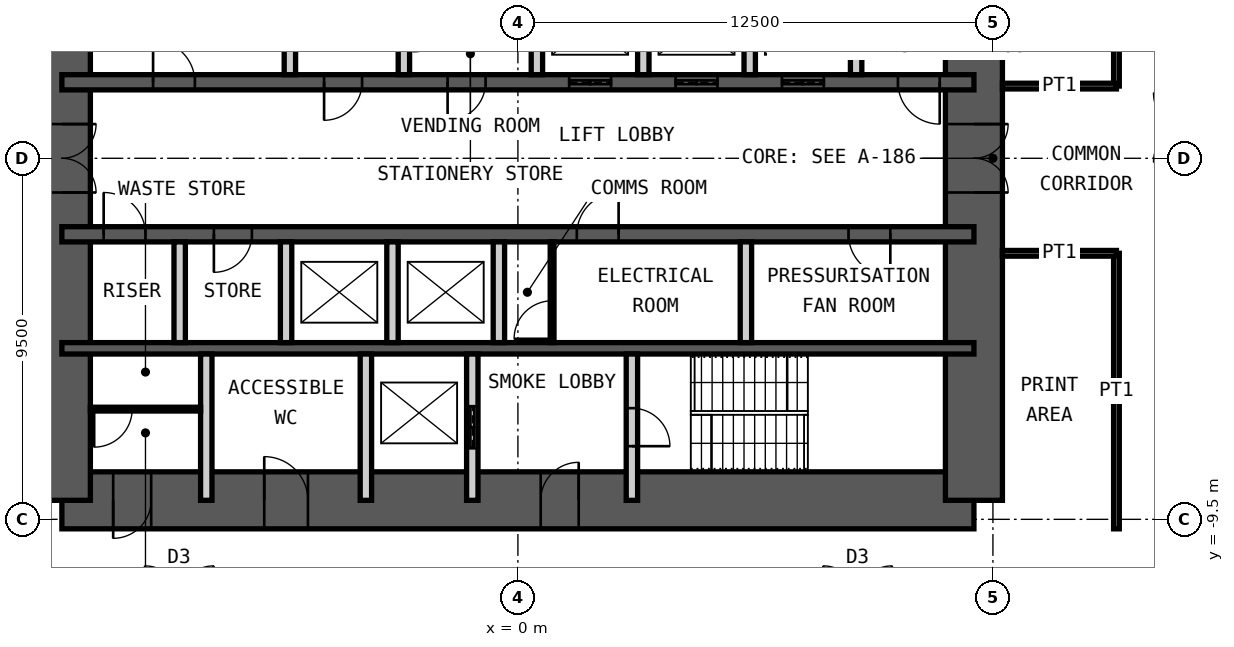
"""IFC4 building model, lengths in metres.
Left out: names, types, materials, properties, quantities, classifications, styles, units other than length and angle.
Written with IfcOpenShell. Run it as: python <this file> out.ifc"""

import sys

from ifc_helpers import new_model, si_unit, direction, frame, frame_2d, origin, place, context, subcontext, project, spatial, rectangle, extrude, element, fill, save


model = new_model("IFC4")
c1 = context("Model", 3, precision=1e-05, world=origin(), true_north=direction((0.0, 1.0)))
c2 = subcontext(c1, "Body", "Model", "MODEL_VIEW")
j1 = project(units=[si_unit("LENGTHUNIT", "METRE"), si_unit("PLANEANGLEUNIT", "RADIAN")], contexts=[c1])
p1 = place(None, origin())
s1 = spatial("IfcSite", under=j1, at=p1, CompositionType="ELEMENT")
p2 = place(p1, origin())
s2 = spatial("IfcBuilding", under=s1, at=p2, CompositionType="ELEMENT")
p3 = place(p2, frame((0.0, 0.0, 140.8)))
s3 = spatial("IfcBuildingStorey", under=s2, at=p3, CompositionType="ELEMENT", Elevation=140.8)
p4 = place(p3, frame((-12.0, -9.0, 0.0), z_axis=(0.0, 0.0, 1.0), x_axis=(1.0, 0.0, 0.0)))
e1 = element("IfcWall", 1, at=p4, inside=s3, PredefinedType="SHEAR", context=c2, shape_type="SweptSolid", body=[
    extrude(rectangle(XDim=24.0, YDim=1.5, at=frame_2d((12.0, 0.0))), origin(), (0.0, 0.0, 1.0), 4.2),
])
p5 = place(p4, frame((1.35, 0.0, 0.0)))
e2 = element("IfcOpeningElement", 2, at=p5, cuts=e1, PredefinedType="OPENING", context=c2, shape_type="SweptSolid", body=[
    extrude(rectangle(XDim=1.0, YDim=2.1, at=frame_2d((0.5, 1.05))), frame((0.0, 0.76, 0.0), z_axis=(0.0, -1.0, 0.0), x_axis=(1.0, 0.0, 0.0)), (0.0, 0.0, 1.0), 1.52),
])
p6 = place(p4, frame((5.325, 0.0, 0.0)))
e3 = element("IfcOpeningElement", 3, at=p6, cuts=e1, PredefinedType="OPENING", context=c2, shape_type="SweptSolid", body=[
    extrude(rectangle(XDim=1.15, YDim=2.1, at=frame_2d((0.575, 1.05))), frame((0.0, 0.76, 0.0), z_axis=(0.0, -1.0, 0.0), x_axis=(1.0, 0.0, 0.0)), (0.0, 0.0, 1.0), 1.52),
])
p7 = place(p4, frame((12.6, 0.0, 0.0)))
e4 = element("IfcOpeningElement", 4, at=p7, cuts=e1, PredefinedType="OPENING", context=c2, shape_type="SweptSolid", body=[
    extrude(rectangle(XDim=1.0, YDim=2.1, at=frame_2d((0.5, 1.05))), frame((0.0, 0.76, 0.0), z_axis=(0.0, -1.0, 0.0), x_axis=(1.0, 0.0, 0.0)), (0.0, 0.0, 1.0), 1.52),
])
p8 = place(p3, frame((12.0, -9.0, 0.0), z_axis=(0.0, 0.0, 1.0), x_axis=(0.0, 1.0, 0.0)))
e5 = element("IfcWall", 5, at=p8, inside=s3, PredefinedType="SHEAR", context=c2, shape_type="SweptSolid", body=[
    extrude(rectangle(XDim=18.0, YDim=1.5, at=frame_2d((9.0, 0.0))), origin(), (0.0, 0.0, 1.0), 4.2),
])
p9 = place(p8, frame((8.1, 0.0, 0.0)))
e6 = element("IfcOpeningElement", 6, at=p9, cuts=e5, PredefinedType="OPENING", context=c2, shape_type="SweptSolid", body=[
    extrude(rectangle(XDim=1.8, YDim=2.1, at=frame_2d((0.9, 1.05))), frame((0.0, 0.76, 0.0), z_axis=(0.0, -1.0, 0.0), x_axis=(1.0, 0.0, 0.0)), (0.0, 0.0, 1.0), 1.52),
])
p10 = place(p3, frame((-12.0, -9.0, 0.0), z_axis=(0.0, 0.0, 1.0), x_axis=(0.0, 1.0, 0.0)))
e7 = element("IfcWall", 7, at=p10, inside=s3, PredefinedType="SHEAR", context=c2, shape_type="SweptSolid", body=[
    extrude(rectangle(XDim=18.0, YDim=1.5, at=frame_2d((9.0, 0.0))), origin(), (0.0, 0.0, 1.0), 4.2),
])
p11 = place(p10, frame((8.1, 0.0, 0.0)))
e8 = element("IfcOpeningElement", 8, at=p11, cuts=e7, PredefinedType="OPENING", context=c2, shape_type="SweptSolid", body=[
    extrude(rectangle(XDim=1.8, YDim=2.1, at=frame_2d((0.9, 1.05))), frame((0.0, 0.76, 0.0), z_axis=(0.0, -1.0, 0.0), x_axis=(1.0, 0.0, 0.0)), (0.0, 0.0, 1.0), 1.52),
])
p12 = place(p3, frame((-12.0, 2.0, 0.0), z_axis=(0.0, 0.0, 1.0), x_axis=(1.0, 0.0, 0.0)))
e9 = element("IfcWall", 9, at=p12, inside=s3, PredefinedType="SHEAR", context=c2, shape_type="SweptSolid", body=[
    extrude(rectangle(XDim=24.0, YDim=0.4, at=frame_2d((12.0, 0.0))), origin(), (0.0, 0.0, 1.0), 4.2),
])
p13 = place(p12, frame((2.4, 0.0, 0.0)))
e10 = element("IfcOpeningElement", 10, at=p13, cuts=e9, PredefinedType="OPENING", context=c2, shape_type="SweptSolid", body=[
    extrude(rectangle(XDim=1.1, YDim=2.1, at=frame_2d((0.55, 1.05))), frame((0.0, 0.21, 0.0), z_axis=(0.0, -1.0, 0.0), x_axis=(1.0, 0.0, 0.0)), (0.0, 0.0, 1.0), 0.42),
])
p14 = place(p12, frame((22.0, 0.0, 0.0)))
e11 = element("IfcOpeningElement", 11, at=p14, cuts=e9, PredefinedType="OPENING", context=c2, shape_type="SweptSolid", body=[
    extrude(rectangle(XDim=1.1, YDim=2.1, at=frame_2d((0.55, 1.05))), frame((0.0, 0.21, 0.0), z_axis=(0.0, -1.0, 0.0), x_axis=(1.0, 0.0, 0.0)), (0.0, 0.0, 1.0), 0.42),
])
p15 = place(p12, frame((10.15, 0.0, 0.0)))
e12 = element("IfcOpeningElement", 12, at=p15, cuts=e9, PredefinedType="OPENING", context=c2, shape_type="SweptSolid", body=[
    extrude(rectangle(XDim=1.0, YDim=2.1, at=frame_2d((0.5, 1.05))), frame((0.0, 0.21, 0.0), z_axis=(0.0, -1.0, 0.0), x_axis=(1.0, 0.0, 0.0)), (0.0, 0.0, 1.0), 0.42),
])
p16 = place(p12, frame((6.9, 0.0, 0.0)))
e13 = element("IfcOpeningElement", 13, at=p16, cuts=e9, PredefinedType="OPENING", context=c2, shape_type="SweptSolid", body=[
    extrude(rectangle(XDim=1.0, YDim=2.1, at=frame_2d((0.5, 1.05))), frame((0.0, 0.21, 0.0), z_axis=(0.0, -1.0, 0.0), x_axis=(1.0, 0.0, 0.0)), (0.0, 0.0, 1.0), 0.42),
])
p17 = place(p12, frame((13.35, 0.0, 0.0)))
e14 = element("IfcOpeningElement", 14, at=p17, cuts=e9, PredefinedType="OPENING", context=c2, shape_type="SweptSolid", body=[
    extrude(rectangle(XDim=1.1, YDim=2.4, at=frame_2d((0.55, 1.2))), frame((0.0, 0.21, 0.0), z_axis=(0.0, -1.0, 0.0), x_axis=(1.0, 0.0, 0.0)), (0.0, 0.0, 1.0), 0.42),
])
p18 = place(p12, frame((16.15, 0.0, 0.0)))
e15 = element("IfcOpeningElement", 15, at=p18, cuts=e9, PredefinedType="OPENING", context=c2, shape_type="SweptSolid", body=[
    extrude(rectangle(XDim=1.1, YDim=2.4, at=frame_2d((0.55, 1.2))), frame((0.0, 0.21, 0.0), z_axis=(0.0, -1.0, 0.0), x_axis=(1.0, 0.0, 0.0)), (0.0, 0.0, 1.0), 0.42),
])
p19 = place(p12, frame((18.95, 0.0, 0.0)))
e16 = element("IfcOpeningElement", 16, at=p19, cuts=e9, PredefinedType="OPENING", context=c2, shape_type="SweptSolid", body=[
    extrude(rectangle(XDim=1.1, YDim=2.4, at=frame_2d((0.55, 1.2))), frame((0.0, 0.21, 0.0), z_axis=(0.0, -1.0, 0.0), x_axis=(1.0, 0.0, 0.0)), (0.0, 0.0, 1.0), 0.42),
])
p20 = place(p3, frame((-12.0, -2.0, 0.0), z_axis=(0.0, 0.0, 1.0), x_axis=(1.0, 0.0, 0.0)))
e17 = element("IfcWall", 17, at=p20, inside=s3, PredefinedType="SHEAR", context=c2, shape_type="SweptSolid", body=[
    extrude(rectangle(XDim=24.0, YDim=0.4, at=frame_2d((12.0, 0.0))), origin(), (0.0, 0.0, 1.0), 4.2),
])
p21 = place(p20, frame((1.1, 0.0, 0.0)))
e18 = element("IfcOpeningElement", 18, at=p21, cuts=e17, PredefinedType="OPENING", context=c2, shape_type="SweptSolid", body=[
    extrude(rectangle(XDim=1.1, YDim=2.1, at=frame_2d((0.55, 1.05))), frame((0.0, 0.21, 0.0), z_axis=(0.0, -1.0, 0.0), x_axis=(1.0, 0.0, 0.0)), (0.0, 0.0, 1.0), 0.42),
])
p22 = place(p20, frame((13.55, 0.0, 0.0)))
e19 = element("IfcOpeningElement", 19, at=p22, cuts=e17, PredefinedType="OPENING", context=c2, shape_type="SweptSolid", body=[
    extrude(rectangle(XDim=1.1, YDim=2.1, at=frame_2d((0.55, 1.05))), frame((0.0, 0.21, 0.0), z_axis=(0.0, -1.0, 0.0), x_axis=(1.0, 0.0, 0.0)), (0.0, 0.0, 1.0), 0.42),
])
p23 = place(p20, frame((20.7, 0.0, 0.0)))
e20 = element("IfcOpeningElement", 20, at=p23, cuts=e17, PredefinedType="OPENING", context=c2, shape_type="SweptSolid", body=[
    extrude(rectangle(XDim=1.1, YDim=2.1, at=frame_2d((0.55, 1.05))), frame((0.0, 0.21, 0.0), z_axis=(0.0, -1.0, 0.0), x_axis=(1.0, 0.0, 0.0)), (0.0, 0.0, 1.0), 0.42),
])
p24 = place(p20, frame((4.0, 0.0, 0.0)))
e21 = element("IfcOpeningElement", 21, at=p24, cuts=e17, PredefinedType="OPENING", context=c2, shape_type="SweptSolid", body=[
    extrude(rectangle(XDim=1.0, YDim=2.1, at=frame_2d((0.5, 1.05))), frame((0.0, 0.21, 0.0), z_axis=(0.0, -1.0, 0.0), x_axis=(1.0, 0.0, 0.0)), (0.0, 0.0, 1.0), 0.42),
])
p25 = place(p3, frame((-12.0, -5.0, 0.0), z_axis=(0.0, 0.0, 1.0), x_axis=(1.0, 0.0, 0.0)))
e22 = element("IfcWall", 22, at=p25, inside=s3, PredefinedType="SHEAR", context=c2, shape_type="SweptSolid", body=[
    extrude(rectangle(XDim=24.0, YDim=0.3, at=frame_2d((12.0, 0.0))), origin(), (0.0, 0.0, 1.0), 4.2),
])
for number, where, z_axis, x_axis in (
    (23, (-6.0, 2.2, 0.0), (0.0, 0.0, 1.0), (0.0, 1.0, 0.0)),
    (24, (-3.0, 2.2, 0.0), (0.0, 0.0, 1.0), (0.0, 1.0, 0.0)),
    (25, (0.5, 2.2, 0.0), (0.0, 0.0, 1.0), (0.0, 1.0, 0.0)),
    (26, (3.3, 2.2, 0.0), (0.0, 0.0, 1.0), (0.0, 1.0, 0.0)),
    (27, (6.1, 2.2, 0.0), (0.0, 0.0, 1.0), (0.0, 1.0, 0.0)),
    (28, (8.9, 2.2, 0.0), (0.0, 0.0, 1.0), (0.0, 1.0, 0.0)),
    (29, (-8.9, -4.85, 0.0), (0.0, 0.0, 1.0), (0.0, 1.0, 0.0)),
    (30, (-6.1, -4.85, 0.0), (0.0, 0.0, 1.0), (0.0, 1.0, 0.0)),
    (31, (-3.3, -4.85, 0.0), (0.0, 0.0, 1.0), (0.0, 1.0, 0.0)),
    (32, (-0.5, -4.85, 0.0), (0.0, 0.0, 1.0), (0.0, 1.0, 0.0)),
    (33, (6.0, -4.85, 0.0), (0.0, 0.0, 1.0), (0.0, 1.0, 0.0)),
):
    element("IfcWall", number, at=place(p3, frame(where, z_axis=z_axis, x_axis=x_axis)), inside=s3, PredefinedType="PARTITIONING", context=c2, shape_type="SweptSolid", body=[
        extrude(rectangle(XDim=2.65, YDim=0.3, at=frame_2d((1.325, 0.0))), origin(), (0.0, 0.0, 1.0), 3.98),
    ])
for number, where, z_axis, x_axis in (
    (34, (-8.2, -9.0, 0.0), (0.0, 0.0, 1.0), (0.0, 1.0, 0.0)),
    (35, (-4.0, -9.0, 0.0), (0.0, 0.0, 1.0), (0.0, 1.0, 0.0)),
):
    element("IfcWall", number, at=place(p3, frame(where, z_axis=z_axis, x_axis=x_axis)), inside=s3, PredefinedType="PARTITIONING", context=c2, shape_type="SweptSolid", body=[
        extrude(rectangle(XDim=3.85, YDim=0.3, at=frame_2d((1.925, 0.0))), origin(), (0.0, 0.0, 1.0), 3.98),
    ])
p26 = place(p3, frame((-1.2, -9.0, 0.0), z_axis=(0.0, 0.0, 1.0), x_axis=(0.0, 1.0, 0.0)))
e36 = element("IfcWall", 36, at=p26, inside=s3, PredefinedType="PARTITIONING", context=c2, shape_type="SweptSolid", body=[
    extrude(rectangle(XDim=3.85, YDim=0.3, at=frame_2d((1.925, 0.0))), origin(), (0.0, 0.0, 1.0), 3.98),
])
p27 = place(p26, frame((1.375, 0.0, 0.0)))
e37 = element("IfcOpeningElement", 37, at=p27, cuts=e36, PredefinedType="OPENING", context=c2, shape_type="SweptSolid", body=[
    extrude(rectangle(XDim=1.1, YDim=2.4, at=frame_2d((0.55, 1.2))), frame((0.0, 0.16, 0.0), z_axis=(0.0, -1.0, 0.0), x_axis=(1.0, 0.0, 0.0)), (0.0, 0.0, 1.0), 0.32),
])
p28 = place(p3, frame((3.0, -9.0, 0.0), z_axis=(0.0, 0.0, 1.0), x_axis=(0.0, 1.0, 0.0)))
e38 = element("IfcWall", 38, at=p28, inside=s3, PredefinedType="PARTITIONING", context=c2, shape_type="SweptSolid", body=[
    extrude(rectangle(XDim=3.85, YDim=0.3, at=frame_2d((1.925, 0.0))), origin(), (0.0, 0.0, 1.0), 3.98),
])
p29 = place(p28, frame((1.425, 0.0, 0.0)))
e39 = element("IfcOpeningElement", 39, at=p29, cuts=e38, PredefinedType="OPENING", context=c2, shape_type="SweptSolid", body=[
    extrude(rectangle(XDim=1.0, YDim=2.1, at=frame_2d((0.5, 1.05))), frame((0.0, 0.16, 0.0), z_axis=(0.0, -1.0, 0.0), x_axis=(1.0, 0.0, 0.0)), (0.0, 0.0, 1.0), 0.32),
])
p30 = place(p3, frame((0.9, -4.85, 0.0), z_axis=(0.0, 0.0, 1.0), x_axis=(0.0, 1.0, 0.0)))
e40 = element("IfcWall", 40, at=p30, inside=s3, PredefinedType="PARTITIONING", context=c2, shape_type="SweptSolid", body=[
    extrude(rectangle(XDim=2.65, YDim=0.1, at=frame_2d((1.325, 0.0))), origin(), (0.0, 0.0, 1.0), 3.98),
])
p31 = place(p30, frame((0.1, 0.0, 0.0)))
e41 = element("IfcOpeningElement", 41, at=p31, cuts=e40, PredefinedType="OPENING", context=c2, shape_type="SweptSolid", body=[
    extrude(rectangle(XDim=1.0, YDim=2.4, at=frame_2d((0.5, 1.2))), frame((0.0, 0.06, 0.0), z_axis=(0.0, -1.0, 0.0), x_axis=(1.0, 0.0, 0.0)), (0.0, 0.0, 1.0), 0.12),
])
p32 = place(p3, frame((-11.25, -6.6, 0.0), z_axis=(0.0, 0.0, 1.0), x_axis=(1.0, 0.0, 0.0)))
e42 = element("IfcWall", 42, at=p32, inside=s3, PredefinedType="PARTITIONING", context=c2, shape_type="SweptSolid", body=[
    extrude(rectangle(XDim=2.9, YDim=0.1, at=frame_2d((1.45, 0.0))), origin(), (0.0, 0.0, 1.0), 3.98),
])
p33 = place(p32, frame((0.1, 0.0, 0.0)))
e43 = element("IfcOpeningElement", 43, at=p33, cuts=e42, PredefinedType="OPENING", context=c2, shape_type="SweptSolid", body=[
    extrude(rectangle(XDim=1.0, YDim=2.4, at=frame_2d((0.5, 1.2))), frame((0.0, 0.06, 0.0), z_axis=(0.0, -1.0, 0.0), x_axis=(1.0, 0.0, 0.0)), (0.0, 0.0, 1.0), 0.12),
])
p34 = place(p3, frame((15.75, 1.9, 0.0), z_axis=(0.0, 0.0, 1.0), x_axis=(0.0, 1.0, 0.0)))
e44 = element("IfcWall", 44, at=p34, inside=s3, PredefinedType="PARTITIONING", context=c2, shape_type="SweptSolid", body=[
    extrude(rectangle(XDim=7.85, YDim=0.15, at=frame_2d((3.925, 0.0))), origin(), (0.0, 0.0, 1.0), 4.03),
])
p35 = place(p3, frame((12.75, 1.9, 0.0), z_axis=(0.0, 0.0, 1.0), x_axis=(1.0, 0.0, 0.0)))
e45 = element("IfcWall", 45, at=p35, inside=s3, PredefinedType="PARTITIONING", context=c2, shape_type="SweptSolid", body=[
    extrude(rectangle(XDim=3.0, YDim=0.15, at=frame_2d((1.5, 0.0))), origin(), (0.0, 0.0, 1.0), 2.93),
])
p36 = place(p3, frame((15.75, -9.75, 0.0), z_axis=(0.0, 0.0, 1.0), x_axis=(0.0, 1.0, 0.0)))
e46 = element("IfcWall", 46, at=p36, inside=s3, PredefinedType="PARTITIONING", context=c2, shape_type="SweptSolid", body=[
    extrude(rectangle(XDim=7.25, YDim=0.15, at=frame_2d((3.625, 0.0))), origin(), (0.0, 0.0, 1.0), 4.03),
])
p37 = place(p3, frame((12.75, -2.5, 0.0), z_axis=(0.0, 0.0, 1.0), x_axis=(1.0, 0.0, 0.0)))
e47 = element("IfcWall", 47, at=p37, inside=s3, PredefinedType="PARTITIONING", context=c2, shape_type="SweptSolid", body=[
    extrude(rectangle(XDim=3.0, YDim=0.15, at=frame_2d((1.5, 0.0))), origin(), (0.0, 0.0, 1.0), 3.33),
])
p38 = place(p5, origin())
e48 = element("IfcDoor", 48, at=p38, inside=s3, OperationType="SINGLE_SWING_LEFT", PredefinedType="DOOR", context=c2, shape_type="SweptSolid", body=[
    extrude(rectangle(XDim=1.0, YDim=2.1, at=frame_2d((0.5, 1.05))), frame((0.0, 0.025, 0.0), z_axis=(0.0, -1.0, 0.0), x_axis=(1.0, 0.0, 0.0)), (0.0, 0.0, 1.0), 0.05),
])
fill(e2, e48)
p39 = place(p6, origin())
e49 = element("IfcDoor", 49, at=p39, inside=s3, OperationType="SINGLE_SWING_RIGHT", PredefinedType="DOOR", context=c2, shape_type="SweptSolid", body=[
    extrude(rectangle(XDim=1.15, YDim=2.1, at=frame_2d((0.575, 1.05))), frame((0.0, 0.025, 0.0), z_axis=(0.0, -1.0, 0.0), x_axis=(1.0, 0.0, 0.0)), (0.0, 0.0, 1.0), 0.05),
])
fill(e3, e49)
p40 = place(p7, origin())
e50 = element("IfcDoor", 50, at=p40, inside=s3, OperationType="SINGLE_SWING_LEFT", PredefinedType="DOOR", context=c2, shape_type="SweptSolid", body=[
    extrude(rectangle(XDim=1.0, YDim=2.1, at=frame_2d((0.5, 1.05))), frame((0.0, 0.025, 0.0), z_axis=(0.0, -1.0, 0.0), x_axis=(1.0, 0.0, 0.0)), (0.0, 0.0, 1.0), 0.05),
])
fill(e4, e50)
p41 = place(p29, origin())
e51 = element("IfcDoor", 51, at=p41, inside=s3, OperationType="SINGLE_SWING_LEFT", PredefinedType="DOOR", context=c2, shape_type="SweptSolid", body=[
    extrude(rectangle(XDim=1.0, YDim=2.1, at=frame_2d((0.5, 1.05))), frame((0.0, 0.025, 0.0), z_axis=(0.0, -1.0, 0.0), x_axis=(1.0, 0.0, 0.0)), (0.0, 0.0, 1.0), 0.05),
])
fill(e39, e51)
p42 = place(p13, origin())
e52 = element("IfcDoor", 52, at=p42, inside=s3, OperationType="SINGLE_SWING_RIGHT", PredefinedType="DOOR", context=c2, shape_type="SweptSolid", body=[
    extrude(rectangle(XDim=1.1, YDim=2.1, at=frame_2d((0.55, 1.05))), frame((0.0, 0.025, 0.0), z_axis=(0.0, -1.0, 0.0), x_axis=(1.0, 0.0, 0.0)), (0.0, 0.0, 1.0), 0.05),
])
fill(e10, e52)
p43 = place(p21, origin())
e53 = element("IfcDoor", 53, at=p43, inside=s3, OperationType="SINGLE_SWING_RIGHT", PredefinedType="DOOR", context=c2, shape_type="SweptSolid", body=[
    extrude(rectangle(XDim=1.1, YDim=2.1, at=frame_2d((0.55, 1.05))), frame((0.0, 0.025, 0.0), z_axis=(0.0, -1.0, 0.0), x_axis=(1.0, 0.0, 0.0)), (0.0, 0.0, 1.0), 0.05),
])
fill(e18, e53)
p44 = place(p14, origin())
e54 = element("IfcDoor", 54, at=p44, inside=s3, OperationType="SINGLE_SWING_RIGHT", PredefinedType="DOOR", context=c2, shape_type="SweptSolid", body=[
    extrude(rectangle(XDim=1.1, YDim=2.1, at=frame_2d((0.55, 1.05))), frame((0.0, 0.025, 0.0), z_axis=(0.0, -1.0, 0.0), x_axis=(1.0, 0.0, 0.0)), (0.0, 0.0, 1.0), 0.05),
])
fill(e11, e54)
p45 = place(p15, origin())
e55 = element("IfcDoor", 55, at=p45, inside=s3, OperationType="SINGLE_SWING_LEFT", PredefinedType="DOOR", context=c2, shape_type="SweptSolid", body=[
    extrude(rectangle(XDim=1.0, YDim=2.1, at=frame_2d((0.5, 1.05))), frame((0.0, 0.025, 0.0), z_axis=(0.0, -1.0, 0.0), x_axis=(1.0, 0.0, 0.0)), (0.0, 0.0, 1.0), 0.05),
])
fill(e12, e55)
p46 = place(p22, origin())
e56 = element("IfcDoor", 56, at=p46, inside=s3, OperationType="SINGLE_SWING_LEFT", PredefinedType="DOOR", context=c2, shape_type="SweptSolid", body=[
    extrude(rectangle(XDim=1.1, YDim=2.1, at=frame_2d((0.55, 1.05))), frame((0.0, 0.025, 0.0), z_axis=(0.0, -1.0, 0.0), x_axis=(1.0, 0.0, 0.0)), (0.0, 0.0, 1.0), 0.05),
])
fill(e19, e56)
p47 = place(p23, origin())
e57 = element("IfcDoor", 57, at=p47, inside=s3, OperationType="SINGLE_SWING_RIGHT", PredefinedType="DOOR", context=c2, shape_type="SweptSolid", body=[
    extrude(rectangle(XDim=1.1, YDim=2.1, at=frame_2d((0.55, 1.05))), frame((0.0, 0.025, 0.0), z_axis=(0.0, -1.0, 0.0), x_axis=(1.0, 0.0, 0.0)), (0.0, 0.0, 1.0), 0.05),
])
fill(e20, e57)
p48 = place(p9, origin())
e58 = element("IfcDoor", 58, at=p48, inside=s3, OperationType="DOUBLE_DOOR_DOUBLE_SWING", PredefinedType="DOOR", context=c2, shape_type="SweptSolid", body=[
    extrude(rectangle(XDim=1.8, YDim=2.1, at=frame_2d((0.9, 1.05))), frame((0.0, 0.025, 0.0), z_axis=(0.0, -1.0, 0.0), x_axis=(1.0, 0.0, 0.0)), (0.0, 0.0, 1.0), 0.05),
])
fill(e6, e58)
p49 = place(p11, origin())
e59 = element("IfcDoor", 59, at=p49, inside=s3, OperationType="DOUBLE_DOOR_DOUBLE_SWING", PredefinedType="DOOR", context=c2, shape_type="SweptSolid", body=[
    extrude(rectangle(XDim=1.8, YDim=2.1, at=frame_2d((0.9, 1.05))), frame((0.0, 0.025, 0.0), z_axis=(0.0, -1.0, 0.0), x_axis=(1.0, 0.0, 0.0)), (0.0, 0.0, 1.0), 0.05),
])
fill(e8, e59)
p50 = place(p27, origin())
e60 = element("IfcDoor", 60, at=p50, inside=s3, OperationType="DOUBLE_DOOR_SLIDING", PredefinedType="DOOR", context=c2, shape_type="SweptSolid", body=[
    extrude(rectangle(XDim=1.1, YDim=2.4, at=frame_2d((0.55, 1.2))), frame((0.0, 0.025, 0.0), z_axis=(0.0, -1.0, 0.0), x_axis=(1.0, 0.0, 0.0)), (0.0, 0.0, 1.0), 0.05),
])
fill(e37, e60)
p51 = place(p16, origin())
e61 = element("IfcDoor", 61, at=p51, inside=s3, OperationType="SINGLE_SWING_LEFT", PredefinedType="DOOR", context=c2, shape_type="SweptSolid", body=[
    extrude(rectangle(XDim=1.0, YDim=2.1, at=frame_2d((0.5, 1.05))), frame((0.0, 0.025, 0.0), z_axis=(0.0, -1.0, 0.0), x_axis=(1.0, 0.0, 0.0)), (0.0, 0.0, 1.0), 0.05),
])
fill(e13, e61)
p52 = place(p17, origin())
e62 = element("IfcDoor", 62, at=p52, inside=s3, OperationType="DOUBLE_DOOR_SLIDING", PredefinedType="DOOR", context=c2, shape_type="SweptSolid", body=[
    extrude(rectangle(XDim=1.1, YDim=2.4, at=frame_2d((0.55, 1.2))), frame((0.0, 0.025, 0.0), z_axis=(0.0, -1.0, 0.0), x_axis=(1.0, 0.0, 0.0)), (0.0, 0.0, 1.0), 0.05),
])
fill(e14, e62)
p53 = place(p18, origin())
e63 = element("IfcDoor", 63, at=p53, inside=s3, OperationType="DOUBLE_DOOR_SLIDING", PredefinedType="DOOR", context=c2, shape_type="SweptSolid", body=[
    extrude(rectangle(XDim=1.1, YDim=2.4, at=frame_2d((0.55, 1.2))), frame((0.0, 0.025, 0.0), z_axis=(0.0, -1.0, 0.0), x_axis=(1.0, 0.0, 0.0)), (0.0, 0.0, 1.0), 0.05),
])
fill(e15, e63)
p54 = place(p19, origin())
e64 = element("IfcDoor", 64, at=p54, inside=s3, OperationType="DOUBLE_DOOR_SLIDING", PredefinedType="DOOR", context=c2, shape_type="SweptSolid", body=[
    extrude(rectangle(XDim=1.1, YDim=2.4, at=frame_2d((0.55, 1.2))), frame((0.0, 0.025, 0.0), z_axis=(0.0, -1.0, 0.0), x_axis=(1.0, 0.0, 0.0)), (0.0, 0.0, 1.0), 0.05),
])
fill(e16, e64)
p55 = place(p24, origin())
e65 = element("IfcDoor", 65, at=p55, inside=s3, OperationType="SINGLE_SWING_LEFT", PredefinedType="DOOR", context=c2, shape_type="SweptSolid", body=[
    extrude(rectangle(XDim=1.0, YDim=2.1, at=frame_2d((0.5, 1.05))), frame((0.0, 0.025, 0.0), z_axis=(0.0, -1.0, 0.0), x_axis=(1.0, 0.0, 0.0)), (0.0, 0.0, 1.0), 0.05),
])
fill(e21, e65)
p56 = place(p31, origin())
e66 = element("IfcDoor", 66, at=p56, inside=s3, OperationType="SINGLE_SWING_RIGHT", PredefinedType="DOOR", context=c2, shape_type="SweptSolid", body=[
    extrude(rectangle(XDim=1.0, YDim=2.4, at=frame_2d((0.5, 1.2))), frame((0.0, 0.025, 0.0), z_axis=(0.0, -1.0, 0.0), x_axis=(1.0, 0.0, 0.0)), (0.0, 0.0, 1.0), 0.05),
])
fill(e41, e66)
p57 = place(p33, origin())
e67 = element("IfcDoor", 67, at=p57, inside=s3, OperationType="SINGLE_SWING_LEFT", PredefinedType="DOOR", context=c2, shape_type="SweptSolid", body=[
    extrude(rectangle(XDim=1.0, YDim=2.4, at=frame_2d((0.5, 1.2))), frame((0.0, 0.025, 0.0), z_axis=(0.0, -1.0, 0.0), x_axis=(1.0, 0.0, 0.0)), (0.0, 0.0, 1.0), 0.05),
])
fill(e43, e67)
save(model, sys.argv[1])
